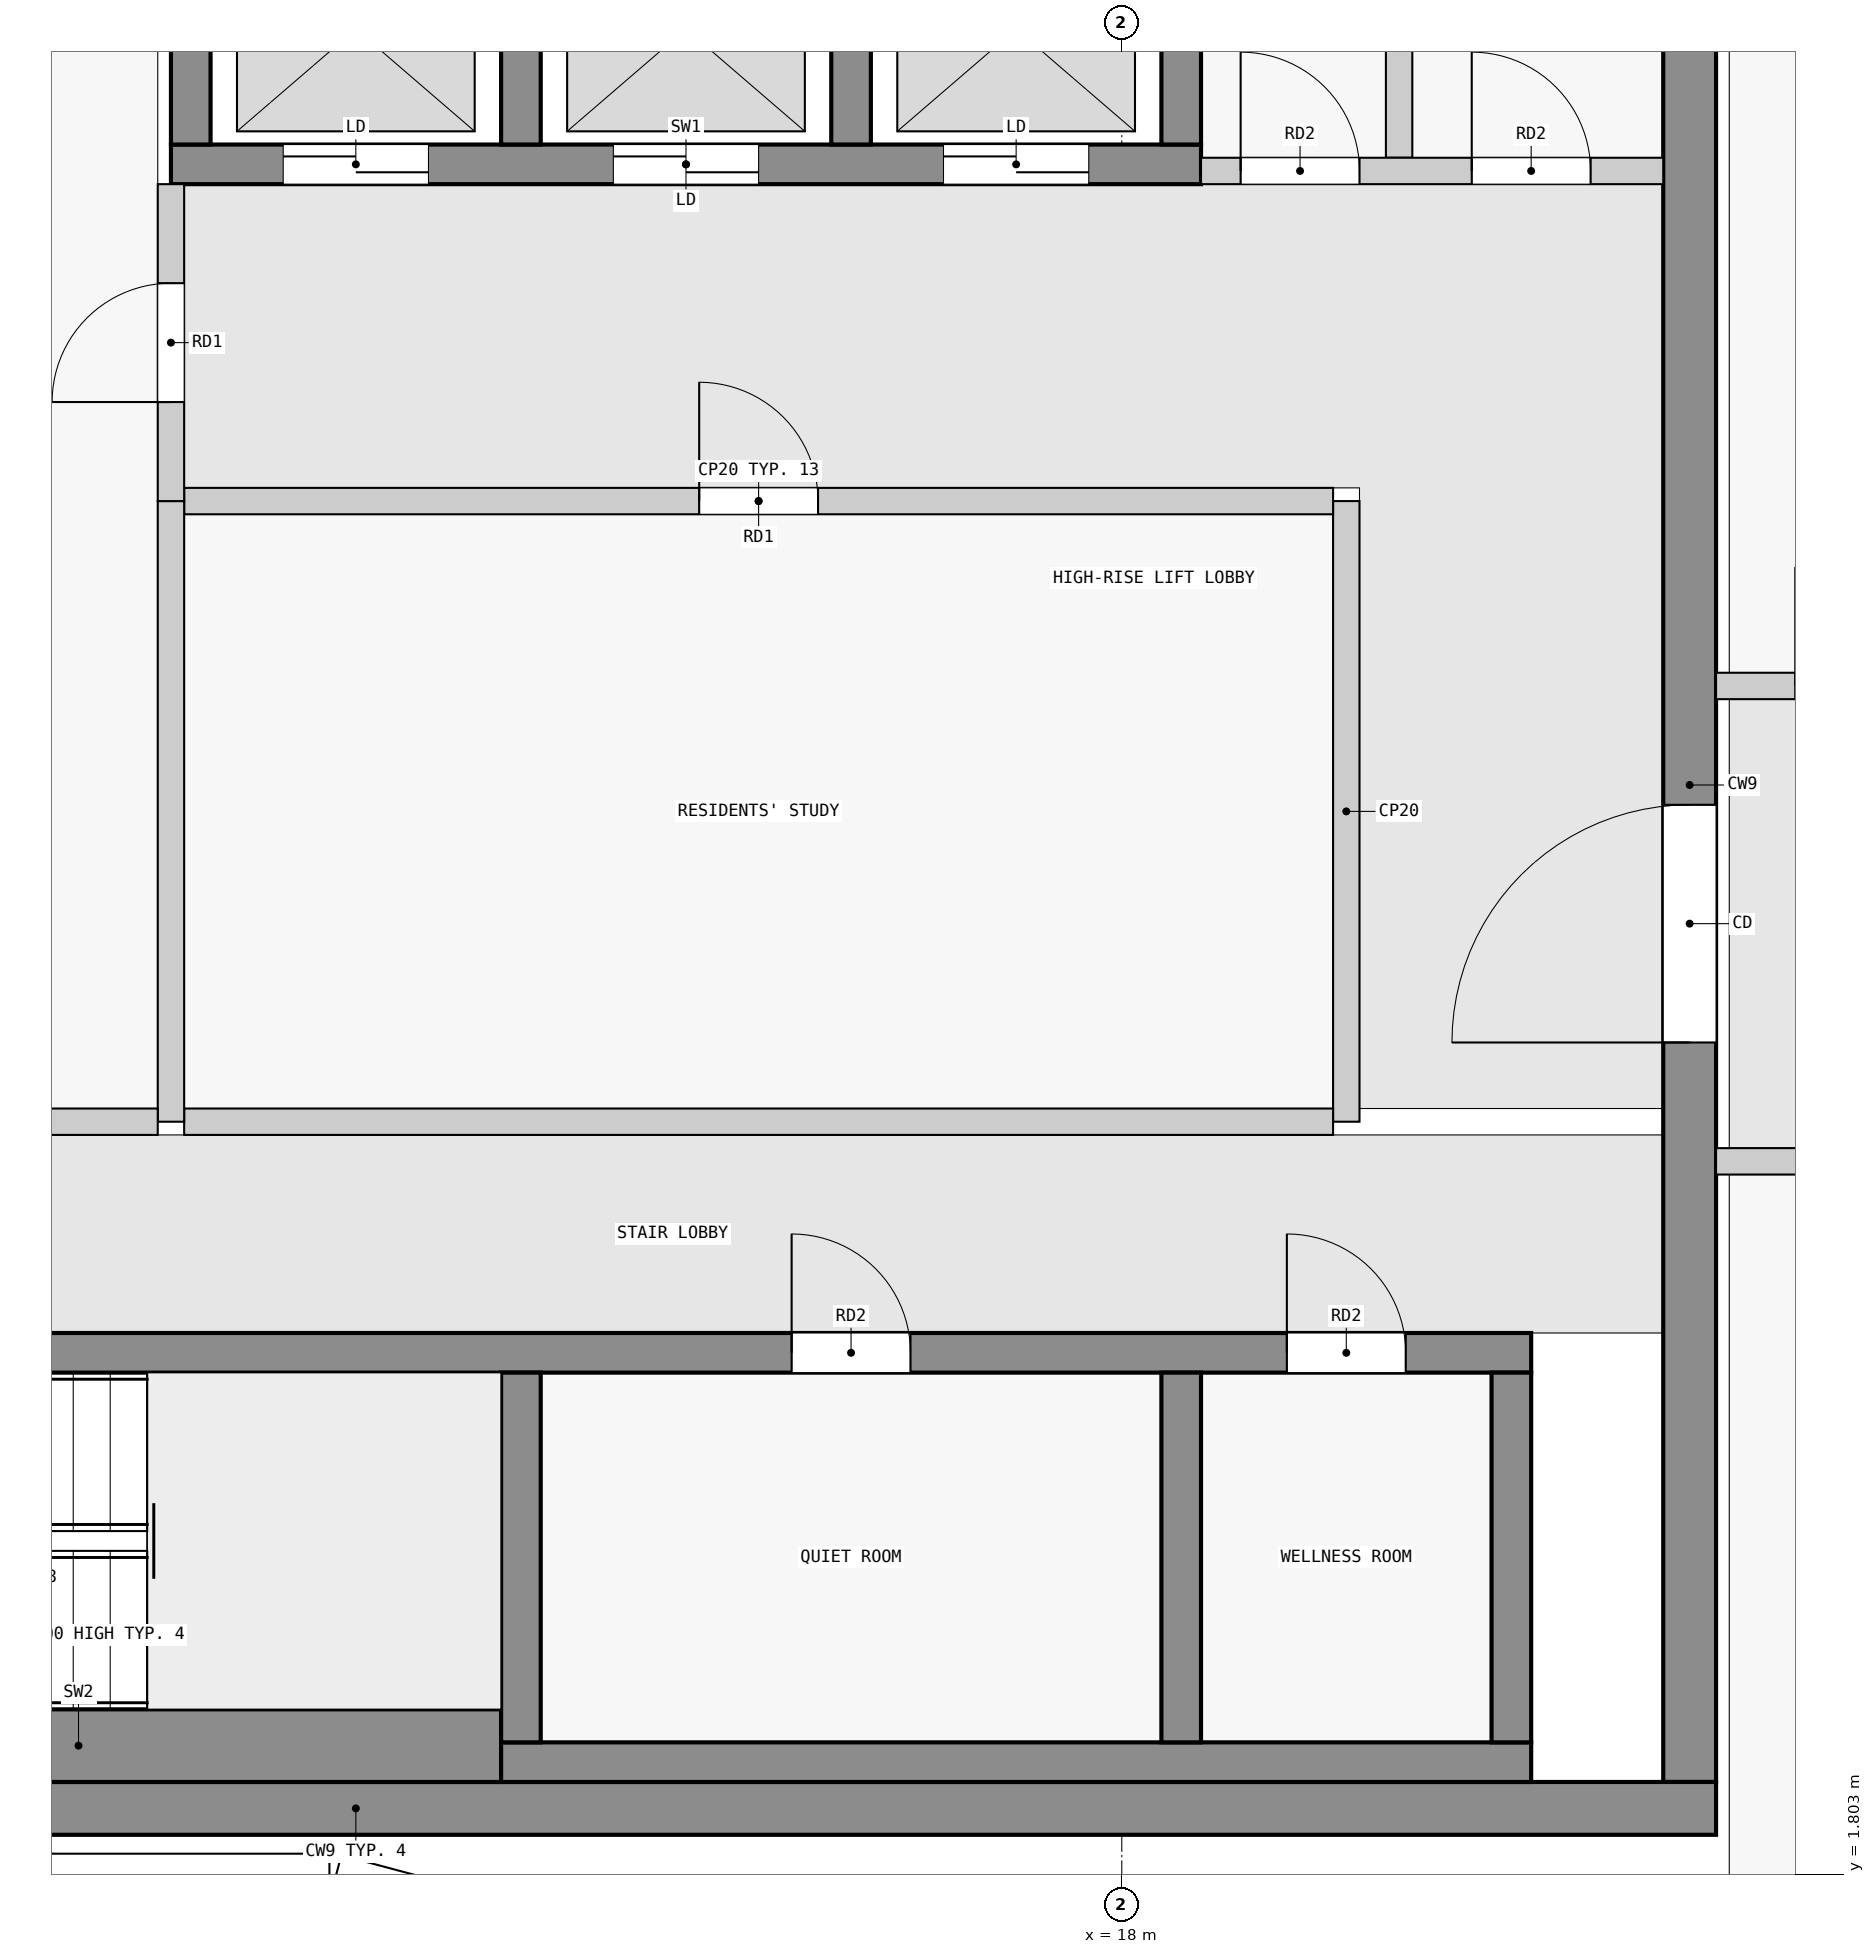
"""IFC4 building model, lengths in metres.
Left out: names, types, materials, properties, quantities, classifications, styles, units other than length and angle.
Written with IfcOpenShell. Run it as: python <this file> out.ifc"""

import sys

from ifc_helpers import new_model, si_unit, direction, frame, frame_2d, origin, place, context, subcontext, project, spatial, rectangle, extrude, element, fill, save


model = new_model("IFC4")
c1 = context("Model", 3, precision=1e-05, world=origin(), true_north=direction((0.0, 1.0)))
c2 = subcontext(c1, "Body", "Model", "MODEL_VIEW")
j1 = project(units=[si_unit("LENGTHUNIT", "METRE"), si_unit("PLANEANGLEUNIT", "RADIAN")], contexts=[c1])
p1 = place(None, origin())
s1 = spatial("IfcSite", under=j1, at=p1, CompositionType="ELEMENT")
p2 = place(p1, origin())
s2 = spatial("IfcBuilding", under=s1, at=p2, CompositionType="ELEMENT")
p3 = place(p2, frame((0.0, 0.0, 305.4)))
s3 = spatial("IfcBuildingStorey", under=s2, at=p3, CompositionType="ELEMENT", Elevation=305.4)
p4 = place(p3, frame((1.9, 2.3, 0.0), z_axis=(0.0, 0.0, 1.0), x_axis=(1.0, 0.0, 0.0)))
e1 = element("IfcWall", 1, at=p4, inside=s3, PredefinedType="SHEAR", context=c2, shape_type="SweptSolid", body=[
    extrude(rectangle(XDim=20.6, YDim=0.4, at=frame_2d((10.3, 0.0))), origin(), (0.0, 0.0, 1.0), 3.25),
])
p5 = place(p3, frame((22.3, 2.5, 0.0), z_axis=(0.0, 0.0, 1.0), x_axis=(0.0, 1.0, 0.0)))
e2 = element("IfcWall", 2, at=p5, inside=s3, PredefinedType="SHEAR", context=c2, shape_type="SweptSolid", body=[
    extrude(rectangle(XDim=15.1, YDim=0.4, at=frame_2d((7.55, 0.0))), origin(), (0.0, 0.0, 1.0), 3.25),
])
p6 = place(p5, frame((5.6, 0.0, 0.0)))
e3 = element("IfcOpeningElement", 3, at=p6, cuts=e2, PredefinedType="OPENING", context=c2, shape_type="SweptSolid", body=[
    extrude(rectangle(XDim=1.8, YDim=2.1, at=frame_2d((0.9, 1.05))), frame((0.0, 0.21, 0.0), z_axis=(0.0, -1.0, 0.0), x_axis=(1.0, 0.0, 0.0)), (0.0, 0.0, 1.0), 0.42),
])
p7 = place(p3, frame((6.9, 2.775, 0.0), z_axis=(0.0, 0.0, 1.0), x_axis=(1.0, 0.0, 0.0)))
e4 = element("IfcWall", 4, at=p7, inside=s3, PredefinedType="SHEAR", context=c2, shape_type="SweptSolid", body=[
    extrude(rectangle(XDim=6.4, YDim=0.55, at=frame_2d((3.2, 0.0))), origin(), (0.0, 0.0, 1.0), 3.25),
])
p8 = place(p3, frame((13.3, 2.65, 0.0), z_axis=(0.0, 0.0, 1.0), x_axis=(1.0, 0.0, 0.0)))
e5 = element("IfcWall", 5, at=p8, inside=s3, PredefinedType="SHEAR", context=c2, shape_type="SweptSolid", body=[
    extrude(rectangle(XDim=7.8, YDim=0.3, at=frame_2d((3.9, 0.0))), origin(), (0.0, 0.0, 1.0), 3.25),
])
for number, where, z_axis, x_axis in (
    (6, (13.45, 2.8, 0.0), (0.0, 0.0, 1.0), (0.0, 1.0, 0.0)),
    (7, (18.45, 2.8, 0.0), (0.0, 0.0, 1.0), (0.0, 1.0, 0.0)),
    (8, (20.95, 2.8, 0.0), (0.0, 0.0, 1.0), (0.0, 1.0, 0.0)),
):
    element("IfcWall", number, at=place(p3, frame(where, z_axis=z_axis, x_axis=x_axis)), inside=s3, PredefinedType="SHEAR", context=c2, shape_type="SweptSolid", body=[
        extrude(rectangle(XDim=2.8, YDim=0.3, at=frame_2d((1.4, 0.0))), origin(), (0.0, 0.0, 1.0), 3.25),
    ])
p9 = place(p3, frame((2.3, 5.75, 0.0), z_axis=(0.0, 0.0, 1.0), x_axis=(1.0, 0.0, 0.0)))
e9 = element("IfcWall", 9, at=p9, inside=s3, PredefinedType="SHEAR", context=c2, shape_type="SweptSolid", body=[
    extrude(rectangle(XDim=18.8, YDim=0.3, at=frame_2d((9.4, 0.0))), origin(), (0.0, 0.0, 1.0), 3.25),
])
p10 = place(p9, frame((4.65, 0.0, 0.0)))
e10 = element("IfcOpeningElement", 10, at=p10, cuts=e9, PredefinedType="OPENING", context=c2, shape_type="SweptSolid", body=[
    extrude(rectangle(XDim=1.1, YDim=2.1, at=frame_2d((0.55, 1.05))), frame((0.0, 0.16, 0.0), z_axis=(0.0, -1.0, 0.0), x_axis=(1.0, 0.0, 0.0)), (0.0, 0.0, 1.0), 0.32),
])
p11 = place(p9, frame((0.45, 0.0, 0.0)))
e11 = element("IfcOpeningElement", 11, at=p11, cuts=e9, PredefinedType="OPENING", context=c2, shape_type="SweptSolid", body=[
    extrude(rectangle(XDim=1.1, YDim=2.1, at=frame_2d((0.55, 1.05))), frame((0.0, 0.16, 0.0), z_axis=(0.0, -1.0, 0.0), x_axis=(1.0, 0.0, 0.0)), (0.0, 0.0, 1.0), 0.32),
])
p12 = place(p9, frame((2.75, 0.0, 0.0)))
e12 = element("IfcOpeningElement", 12, at=p12, cuts=e9, PredefinedType="OPENING", context=c2, shape_type="SweptSolid", body=[
    extrude(rectangle(XDim=1.1, YDim=2.1, at=frame_2d((0.55, 1.05))), frame((0.0, 0.16, 0.0), z_axis=(0.0, -1.0, 0.0), x_axis=(1.0, 0.0, 0.0)), (0.0, 0.0, 1.0), 0.32),
])
p13 = place(p9, frame((13.2, 0.0, 0.0)))
e13 = element("IfcOpeningElement", 13, at=p13, cuts=e9, PredefinedType="OPENING", context=c2, shape_type="SweptSolid", body=[
    extrude(rectangle(XDim=0.9, YDim=2.1, at=frame_2d((0.45, 1.05))), frame((0.0, 0.16, 0.0), z_axis=(0.0, -1.0, 0.0), x_axis=(1.0, 0.0, 0.0)), (0.0, 0.0, 1.0), 0.32),
])
p14 = place(p9, frame((16.95, 0.0, 0.0)))
e14 = element("IfcOpeningElement", 14, at=p14, cuts=e9, PredefinedType="OPENING", context=c2, shape_type="SweptSolid", body=[
    extrude(rectangle(XDim=0.9, YDim=2.1, at=frame_2d((0.45, 1.05))), frame((0.0, 0.16, 0.0), z_axis=(0.0, -1.0, 0.0), x_axis=(1.0, 0.0, 0.0)), (0.0, 0.0, 1.0), 0.32),
])
p15 = place(p3, frame((10.8, 14.75, 0.0), z_axis=(0.0, 0.0, 1.0), x_axis=(1.0, 0.0, 0.0)))
e15 = element("IfcWall", 15, at=p15, inside=s3, PredefinedType="SHEAR", context=c2, shape_type="SweptSolid", body=[
    extrude(rectangle(XDim=7.8, YDim=0.3, at=frame_2d((3.9, 0.0))), origin(), (0.0, 0.0, 1.0), 3.25),
])
p16 = place(p15, frame((0.85, 0.0, 0.0)))
e16 = element("IfcOpeningElement", 16, at=p16, cuts=e15, PredefinedType="OPENING", context=c2, shape_type="SweptSolid", body=[
    extrude(rectangle(XDim=1.1, YDim=2.1, at=frame_2d((0.55, 1.05))), frame((0.0, 0.16, 0.0), z_axis=(0.0, -1.0, 0.0), x_axis=(1.0, 0.0, 0.0)), (0.0, 0.0, 1.0), 0.32),
])
p17 = place(p15, frame((3.35, 0.0, 0.0)))
e17 = element("IfcOpeningElement", 17, at=p17, cuts=e15, PredefinedType="OPENING", context=c2, shape_type="SweptSolid", body=[
    extrude(rectangle(XDim=1.1, YDim=2.1, at=frame_2d((0.55, 1.05))), frame((0.0, 0.16, 0.0), z_axis=(0.0, -1.0, 0.0), x_axis=(1.0, 0.0, 0.0)), (0.0, 0.0, 1.0), 0.32),
])
p18 = place(p15, frame((5.85, 0.0, 0.0)))
e18 = element("IfcOpeningElement", 18, at=p18, cuts=e15, PredefinedType="OPENING", context=c2, shape_type="SweptSolid", body=[
    extrude(rectangle(XDim=1.1, YDim=2.1, at=frame_2d((0.55, 1.05))), frame((0.0, 0.16, 0.0), z_axis=(0.0, -1.0, 0.0), x_axis=(1.0, 0.0, 0.0)), (0.0, 0.0, 1.0), 0.32),
])
for number, where, z_axis, x_axis in (
    (19, (10.95, 14.9, 0.0), (0.0, 0.0, 1.0), (0.0, 1.0, 0.0)),
    (20, (13.45, 14.9, 0.0), (0.0, 0.0, 1.0), (0.0, 1.0, 0.0)),
    (21, (15.95, 14.9, 0.0), (0.0, 0.0, 1.0), (0.0, 1.0, 0.0)),
    (22, (18.45, 14.9, 0.0), (0.0, 0.0, 1.0), (0.0, 1.0, 0.0)),
):
    element("IfcWall", number, at=place(p3, frame(where, z_axis=z_axis, x_axis=x_axis)), inside=s3, PredefinedType="SHEAR", context=c2, shape_type="SweptSolid", body=[
        extrude(rectangle(XDim=2.0, YDim=0.3, at=frame_2d((1.0, 0.0))), origin(), (0.0, 0.0, 1.0), 3.25),
    ])
p19 = place(p3, frame((7.1, 7.5, 0.0), z_axis=(0.0, 0.0, 1.0), x_axis=(1.0, 0.0, 0.0)))
e23 = element("IfcWall", 23, at=p19, inside=s3, PredefinedType="PARTITIONING", context=c2, shape_type="SweptSolid", body=[
    extrude(rectangle(XDim=3.6, YDim=0.2, at=frame_2d((1.8, 0.0))), origin(), (0.0, 0.0, 1.0), 3.25),
])
p20 = place(p3, frame((10.8, 12.2, 0.0), z_axis=(0.0, 0.0, 1.0), x_axis=(0.0, 1.0, 0.0)))
e24 = element("IfcWall", 24, at=p20, inside=s3, PredefinedType="PARTITIONING", context=c2, shape_type="SweptSolid", body=[
    extrude(rectangle(XDim=2.4, YDim=0.2, at=frame_2d((1.2, 0.0))), origin(), (0.0, 0.0, 1.0), 3.25),
])
p21 = place(p20, frame((0.75, 0.0, 0.0)))
e25 = element("IfcOpeningElement", 25, at=p21, cuts=e24, PredefinedType="OPENING", context=c2, shape_type="SweptSolid", body=[
    extrude(rectangle(XDim=0.9, YDim=2.1, at=frame_2d((0.45, 1.05))), frame((0.0, 0.11, 0.0), z_axis=(0.0, -1.0, 0.0), x_axis=(1.0, 0.0, 0.0)), (0.0, 0.0, 1.0), 0.22),
])
p22 = place(p3, frame((10.8, 7.5, 0.0), z_axis=(0.0, 0.0, 1.0), x_axis=(0.0, 1.0, 0.0)))
e26 = element("IfcWall", 26, at=p22, inside=s3, PredefinedType="PARTITIONING", context=c2, shape_type="SweptSolid", body=[
    extrude(rectangle(XDim=4.7, YDim=0.2, at=frame_2d((2.35, 0.0))), origin(), (0.0, 0.0, 1.0), 3.25),
])
p23 = place(p3, frame((10.9, 7.5, 0.0), z_axis=(0.0, 0.0, 1.0), x_axis=(1.0, 0.0, 0.0)))
e27 = element("IfcWall", 27, at=p23, inside=s3, PredefinedType="PARTITIONING", context=c2, shape_type="SweptSolid", body=[
    extrude(rectangle(XDim=8.7, YDim=0.2, at=frame_2d((4.35, 0.0))), origin(), (0.0, 0.0, 1.0), 3.25),
])
p24 = place(p3, frame((19.7, 7.5, 0.0), z_axis=(0.0, 0.0, 1.0), x_axis=(0.0, 1.0, 0.0)))
e28 = element("IfcWall", 28, at=p24, inside=s3, PredefinedType="PARTITIONING", context=c2, shape_type="SweptSolid", body=[
    extrude(rectangle(XDim=4.7, YDim=0.2, at=frame_2d((2.35, 0.0))), origin(), (0.0, 0.0, 1.0), 3.25),
])
p25 = place(p3, frame((10.9, 12.2, 0.0), z_axis=(0.0, 0.0, 1.0), x_axis=(1.0, 0.0, 0.0)))
e29 = element("IfcWall", 29, at=p25, inside=s3, PredefinedType="PARTITIONING", context=c2, shape_type="SweptSolid", body=[
    extrude(rectangle(XDim=8.7, YDim=0.2, at=frame_2d((4.35, 0.0))), origin(), (0.0, 0.0, 1.0), 3.25),
])
p26 = place(p25, frame((3.9, 0.0, 0.0)))
e30 = element("IfcOpeningElement", 30, at=p26, cuts=e29, PredefinedType="OPENING", context=c2, shape_type="SweptSolid", body=[
    extrude(rectangle(XDim=0.9, YDim=2.1, at=frame_2d((0.45, 1.05))), frame((0.0, 0.11, 0.0), z_axis=(0.0, -1.0, 0.0), x_axis=(1.0, 0.0, 0.0)), (0.0, 0.0, 1.0), 0.22),
])
p27 = place(p3, frame((18.6, 14.7, 0.0), z_axis=(0.0, 0.0, 1.0), x_axis=(1.0, 0.0, 0.0)))
e31 = element("IfcWall", 31, at=p27, inside=s3, PredefinedType="PARTITIONING", context=c2, shape_type="SweptSolid", body=[
    extrude(rectangle(XDim=3.5, YDim=0.2, at=frame_2d((1.75, 0.0))), origin(), (0.0, 0.0, 1.0), 3.25),
])
p28 = place(p27, frame((0.3, 0.0, 0.0)))
e32 = element("IfcOpeningElement", 32, at=p28, cuts=e31, PredefinedType="OPENING", context=c2, shape_type="SweptSolid", body=[
    extrude(rectangle(XDim=0.9, YDim=2.1, at=frame_2d((0.45, 1.05))), frame((0.0, 0.11, 0.0), z_axis=(0.0, -1.0, 0.0), x_axis=(1.0, 0.0, 0.0)), (0.0, 0.0, 1.0), 0.22),
])
p29 = place(p27, frame((2.05, 0.0, 0.0)))
e33 = element("IfcOpeningElement", 33, at=p29, cuts=e31, PredefinedType="OPENING", context=c2, shape_type="SweptSolid", body=[
    extrude(rectangle(XDim=0.9, YDim=2.1, at=frame_2d((0.45, 1.05))), frame((0.0, 0.11, 0.0), z_axis=(0.0, -1.0, 0.0), x_axis=(1.0, 0.0, 0.0)), (0.0, 0.0, 1.0), 0.22),
])
p30 = place(p3, frame((20.1, 14.8, 0.0), z_axis=(0.0, 0.0, 1.0), x_axis=(0.0, 1.0, 0.0)))
e34 = element("IfcWall", 34, at=p30, inside=s3, PredefinedType="PARTITIONING", context=c2, shape_type="SweptSolid", body=[
    extrude(rectangle(XDim=2.8, YDim=0.2, at=frame_2d((1.4, 0.0))), origin(), (0.0, 0.0, 1.0), 3.25),
])
p31 = place(p3, frame((27.0, 7.2, 0.0), z_axis=(0.0, 0.0, 1.0), x_axis=(-1.0, 0.0, 0.0)))
e35 = element("IfcWall", 35, at=p31, inside=s3, PredefinedType="PARTITIONING", context=c2, shape_type="SweptSolid", body=[
    extrude(rectangle(XDim=4.5, YDim=0.2, at=frame_2d((2.25, 0.0))), origin(), (0.0, 0.0, 1.0), 2.642),
])
p32 = place(p31, frame((1.35, 0.0, 0.0)))
e36 = element("IfcOpeningElement", 36, at=p32, cuts=e35, PredefinedType="OPENING", context=c2, shape_type="SweptSolid", body=[
    extrude(rectangle(XDim=1.8, YDim=2.1, at=frame_2d((0.9, 1.05))), frame((0.0, 0.11, 0.0), z_axis=(0.0, -1.0, 0.0), x_axis=(1.0, 0.0, 0.0)), (0.0, 0.0, 1.0), 0.22),
])
p33 = place(p3, frame((22.5, 10.8, 0.0), z_axis=(0.0, 0.0, 1.0), x_axis=(1.0, 0.0, 0.0)))
e37 = element("IfcWall", 37, at=p33, inside=s3, PredefinedType="PARTITIONING", context=c2, shape_type="SweptSolid", body=[
    extrude(rectangle(XDim=2.25, YDim=0.2, at=frame_2d((1.125, 0.0))), origin(), (0.0, 0.0, 1.0), 3.25),
])
p34 = place(p33, frame((0.6, 0.0, 0.0)))
e38 = element("IfcOpeningElement", 38, at=p34, cuts=e37, PredefinedType="OPENING", context=c2, shape_type="SweptSolid", body=[
    extrude(rectangle(XDim=0.9, YDim=2.1, at=frame_2d((0.45, 1.05))), frame((0.0, 0.11, 0.0), z_axis=(0.0, -1.0, 0.0), x_axis=(1.0, 0.0, 0.0)), (0.0, 0.0, 1.0), 0.22),
])
p35 = place(p21, origin())
e39 = element("IfcDoor", 39, at=p35, inside=s3, OperationType="SINGLE_SWING_LEFT", PredefinedType="DOOR", context=c2, shape_type="SweptSolid", body=[
    extrude(rectangle(XDim=0.9, YDim=2.1, at=frame_2d((0.45, 1.05))), frame((0.0, 0.025, 0.0), z_axis=(0.0, -1.0, 0.0), x_axis=(1.0, 0.0, 0.0)), (0.0, 0.0, 1.0), 0.05),
])
fill(e25, e39)
p36 = place(p26, origin())
e40 = element("IfcDoor", 40, at=p36, inside=s3, OperationType="SINGLE_SWING_LEFT", PredefinedType="DOOR", context=c2, shape_type="SweptSolid", body=[
    extrude(rectangle(XDim=0.9, YDim=2.1, at=frame_2d((0.45, 1.05))), frame((0.0, 0.025, 0.0), z_axis=(0.0, -1.0, 0.0), x_axis=(1.0, 0.0, 0.0)), (0.0, 0.0, 1.0), 0.05),
])
fill(e30, e40)
p37 = place(p16, origin())
e41 = element("IfcDoor", 41, at=p37, inside=s3, OperationType="DOUBLE_DOOR_SLIDING", PredefinedType="DOOR", context=c2, shape_type="SweptSolid", body=[
    extrude(rectangle(XDim=1.1, YDim=2.1, at=frame_2d((0.55, 1.05))), frame((0.0, 0.025, 0.0), z_axis=(0.0, -1.0, 0.0), x_axis=(1.0, 0.0, 0.0)), (0.0, 0.0, 1.0), 0.05),
])
fill(e16, e41)
p38 = place(p17, origin())
e42 = element("IfcDoor", 42, at=p38, inside=s3, OperationType="DOUBLE_DOOR_SLIDING", PredefinedType="DOOR", context=c2, shape_type="SweptSolid", body=[
    extrude(rectangle(XDim=1.1, YDim=2.1, at=frame_2d((0.55, 1.05))), frame((0.0, 0.025, 0.0), z_axis=(0.0, -1.0, 0.0), x_axis=(1.0, 0.0, 0.0)), (0.0, 0.0, 1.0), 0.05),
])
fill(e17, e42)
p39 = place(p18, origin())
e43 = element("IfcDoor", 43, at=p39, inside=s3, OperationType="DOUBLE_DOOR_SLIDING", PredefinedType="DOOR", context=c2, shape_type="SweptSolid", body=[
    extrude(rectangle(XDim=1.1, YDim=2.1, at=frame_2d((0.55, 1.05))), frame((0.0, 0.025, 0.0), z_axis=(0.0, -1.0, 0.0), x_axis=(1.0, 0.0, 0.0)), (0.0, 0.0, 1.0), 0.05),
])
fill(e18, e43)
p40 = place(p6, origin())
e44 = element("IfcDoor", 44, at=p40, inside=s3, OperationType="DOUBLE_DOOR_SINGLE_SWING", PredefinedType="DOOR", context=c2, shape_type="SweptSolid", body=[
    extrude(rectangle(XDim=1.8, YDim=2.1, at=frame_2d((0.9, 1.05))), frame((0.0, 0.025, 0.0), z_axis=(0.0, -1.0, 0.0), x_axis=(1.0, 0.0, 0.0)), (0.0, 0.0, 1.0), 0.05),
])
fill(e3, e44)
p41 = place(p28, origin())
e45 = element("IfcDoor", 45, at=p41, inside=s3, OperationType="SINGLE_SWING_LEFT", PredefinedType="DOOR", context=c2, shape_type="SweptSolid", body=[
    extrude(rectangle(XDim=0.9, YDim=2.1, at=frame_2d((0.45, 1.05))), frame((0.0, 0.025, 0.0), z_axis=(0.0, -1.0, 0.0), x_axis=(1.0, 0.0, 0.0)), (0.0, 0.0, 1.0), 0.05),
])
fill(e32, e45)
p42 = place(p29, origin())
e46 = element("IfcDoor", 46, at=p42, inside=s3, OperationType="SINGLE_SWING_LEFT", PredefinedType="DOOR", context=c2, shape_type="SweptSolid", body=[
    extrude(rectangle(XDim=0.9, YDim=2.1, at=frame_2d((0.45, 1.05))), frame((0.0, 0.025, 0.0), z_axis=(0.0, -1.0, 0.0), x_axis=(1.0, 0.0, 0.0)), (0.0, 0.0, 1.0), 0.05),
])
fill(e33, e46)
p43 = place(p13, origin())
e47 = element("IfcDoor", 47, at=p43, inside=s3, OperationType="SINGLE_SWING_LEFT", PredefinedType="DOOR", context=c2, shape_type="SweptSolid", body=[
    extrude(rectangle(XDim=0.9, YDim=2.1, at=frame_2d((0.45, 1.05))), frame((0.0, 0.025, 0.0), z_axis=(0.0, -1.0, 0.0), x_axis=(1.0, 0.0, 0.0)), (0.0, 0.0, 1.0), 0.05),
])
fill(e13, e47)
p44 = place(p14, origin())
e48 = element("IfcDoor", 48, at=p44, inside=s3, OperationType="SINGLE_SWING_LEFT", PredefinedType="DOOR", context=c2, shape_type="SweptSolid", body=[
    extrude(rectangle(XDim=0.9, YDim=2.1, at=frame_2d((0.45, 1.05))), frame((0.0, 0.025, 0.0), z_axis=(0.0, -1.0, 0.0), x_axis=(1.0, 0.0, 0.0)), (0.0, 0.0, 1.0), 0.05),
])
fill(e14, e48)
save(model, sys.argv[1])
